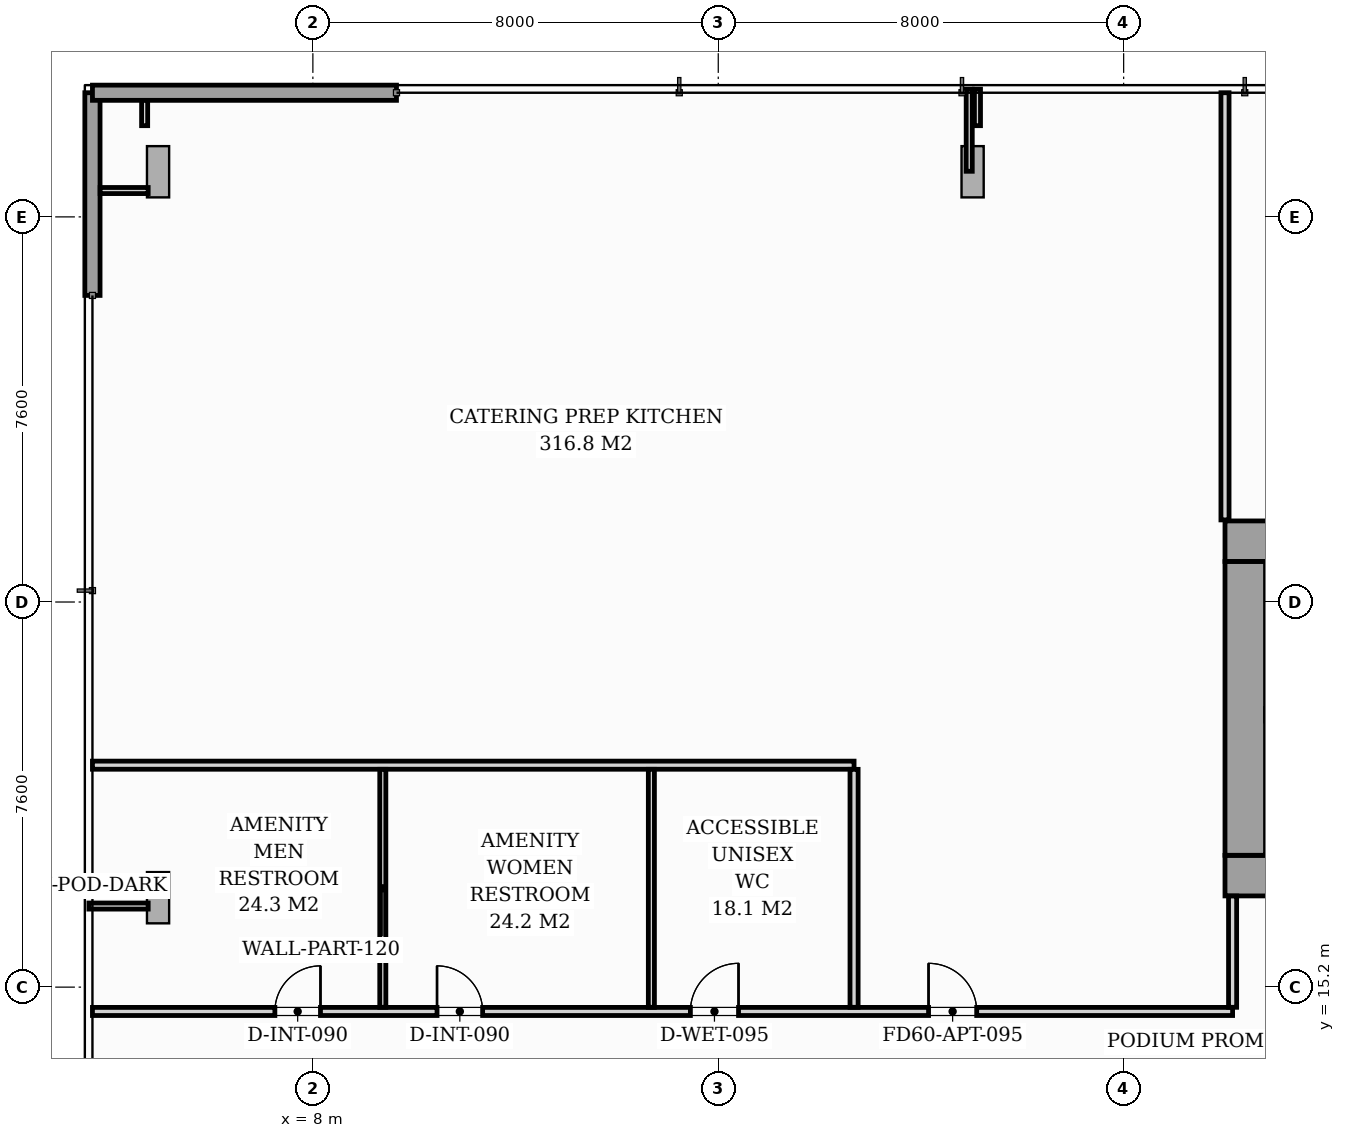
"""IFC4 building model, lengths in metres.
Left out: names, types, materials, properties, quantities, classifications, styles, units other than length and angle.
Written with IfcOpenShell. Run it as: python <this file> out.ifc"""

import sys

from ifc_helpers import new_model, si_unit, direction, frame, frame_2d, origin, origin_2d, place, context, subcontext, project, spatial, rectangle, i_section, extrude, source, transform, mapped, element, fill, save


model = new_model("IFC4")
c1 = context("Model", 3, precision=1e-05, world=origin(), true_north=direction((0.0, 1.0)))
c2 = subcontext(c1, "Body", "Model", "MODEL_VIEW")
j1 = project(units=[si_unit("LENGTHUNIT", "METRE"), si_unit("PLANEANGLEUNIT", "RADIAN")], contexts=[c1])
p1 = place(None, origin())
s1 = spatial("IfcSite", under=j1, at=p1, CompositionType="ELEMENT")
p2 = place(p1, origin())
s2 = spatial("IfcBuilding", under=s1, at=p2, CompositionType="ELEMENT")
p3 = place(p2, frame((0.0, 0.0, 14.0)))
s3 = spatial("IfcBuildingStorey", under=s2, at=p3, CompositionType="ELEMENT", Elevation=14.0)
m1 = source(origin(), c2, "Body", "SweptSolid", [
    extrude(i_section(OverallWidth=0.437, OverallDepth=0.514, WebThickness=0.061, FlangeThickness=0.097, FilletRadius=0.018, at=origin_2d()), origin(), (0.0, 0.0, 1.0), 4.496),
])
for number, where, z_axis, x_axis in (
    (1, (26.4, 17.4, 0.002), (0.0, 0.0, 1.0), (1.0, 0.0, 0.0)),
    (2, (26.4, 24.0, 0.002), (0.0, 0.0, 1.0), (1.0, 0.0, 0.0)),
):
    element("IfcColumn", number, at=place(p3, frame(where, z_axis=z_axis, x_axis=x_axis)), inside=s3, PredefinedType="PILASTER", context=c2, shape_type="MappedRepresentation", body=[
        mapped(m1, transform((0.0, 0.0, 0.0), scale=1.0)),
    ])
m2 = source(origin(), c2, "Body", "SweptSolid", [
    extrude(i_section(OverallWidth=0.438, OverallDepth=1.011, WebThickness=0.041, FlangeThickness=0.074, FilletRadius=0.024, at=origin_2d()), origin(), (0.0, 0.0, 1.0), 4.307),
])
p4 = place(p3, frame((4.704, 31.772, 0.109), z_axis=(0.197794721516, -0.395646133982, 0.896850815245), x_axis=(-0.401037899651, 0.802190742809, 0.442333149554)))
e3 = element("IfcColumn", 3, at=p4, inside=s3, PredefinedType="COLUMN", context=c2, shape_type="MappedRepresentation", body=[
    mapped(m2, transform((0.0, 0.0, 0.0), scale=1.0)),
])
m3 = source(origin(), c2, "Body", "SweptSolid", [
    extrude(i_section(OverallWidth=0.438, OverallDepth=1.011, WebThickness=0.041, FlangeThickness=0.074, FilletRadius=0.024, at=origin_2d()), origin(), (0.0, 0.0, 1.0), 4.249),
])
p5 = place(p3, frame((21.107, 31.775, 0.102), z_axis=(-0.072689306686, -0.402578089045, 0.912495011994), x_axis=(0.162137870713, 0.897974642067, 0.409087830527)))
e4 = element("IfcColumn", 4, at=p5, inside=s3, PredefinedType="COLUMN", context=c2, shape_type="MappedRepresentation", body=[
    mapped(m3, transform((0.0, 0.0, 0.0), scale=1.0)),
])
m4 = source(origin(), c2, "Body", "SweptSolid", [
    extrude(i_section(OverallWidth=0.438, OverallDepth=1.011, WebThickness=0.041, FlangeThickness=0.074, FilletRadius=0.024, at=origin_2d()), origin(), (0.0, 0.0, 1.0), 4.1),
])
p6 = place(p3, frame((4.696, 17.186, 0.074), z_axis=(0.211578067656, -0.188056160332, 0.959098327518), x_axis=(-0.716861290505, 0.637165199948, 0.283073132162)))
e5 = element("IfcColumn", 5, at=p6, inside=s3, PredefinedType="COLUMN", context=c2, shape_type="MappedRepresentation", body=[
    mapped(m4, transform((0.0, 0.0, 0.0), scale=1.0)),
])
p7 = place(p3, frame((3.65, 28.85, 0.0), z_axis=(0.0, 0.0, 1.0), x_axis=(0.0, 1.0, 0.0)))
e6 = element("IfcWall", 6, at=p7, inside=s3, PredefinedType="STANDARD", context=c2, shape_type="SweptSolid", body=[
    extrude(rectangle(XDim=4.0, YDim=0.3, at=frame_2d((2.0, 0.0))), origin(), (0.0, 0.0, 1.0), 4.08),
])
p8 = place(p3, frame((3.65, 32.85, 0.0), z_axis=(0.0, 0.0, 1.0), x_axis=(1.0, 0.0, 0.0)))
e7 = element("IfcWall", 7, at=p8, inside=s3, PredefinedType="STANDARD", context=c2, shape_type="SweptSolid", body=[
    extrude(rectangle(XDim=6.0, YDim=0.3, at=frame_2d((3.0, 0.0))), origin(), (0.0, 0.0, 1.0), 4.08),
])
p9 = place(p3, frame((26.0, 17.4, 0.0), z_axis=(0.0, 0.0, 1.0), x_axis=(1.0, 0.0, 0.0)))
e8 = element("IfcWall", 8, at=p9, inside=s3, PredefinedType="SHEAR", context=c2, shape_type="SweptSolid", body=[
    extrude(rectangle(XDim=20.0, YDim=0.8, at=frame_2d((10.0, 0.0))), origin(), (0.0, 0.0, 1.0), 4.5),
])
p10 = place(p9, frame((1.15, 0.0, 0.0)))
e9 = element("IfcOpeningElement", 9, at=p10, cuts=e8, PredefinedType="OPENING", context=c2, shape_type="SweptSolid", body=[
    extrude(rectangle(XDim=0.95, YDim=2.06, at=frame_2d((0.475, 1.03))), frame((0.0, 0.41, 0.0), z_axis=(0.0, -1.0, 0.0), x_axis=(1.0, 0.0, 0.0)), (0.0, 0.0, 1.0), 0.82),
])
p11 = place(p9, frame((9.58, 0.0, 0.0)))
e10 = element("IfcOpeningElement", 10, at=p11, cuts=e8, PredefinedType="OPENING", context=c2, shape_type="SweptSolid", body=[
    extrude(rectangle(XDim=0.9, YDim=2.06, at=frame_2d((0.45, 1.03))), frame((0.0, 0.41, 0.0), z_axis=(0.0, -1.0, 0.0), x_axis=(1.0, 0.0, 0.0)), (0.0, 0.0, 1.0), 0.82),
])
p12 = place(p9, frame((17.75, 0.0, 0.0)))
e11 = element("IfcOpeningElement", 11, at=p12, cuts=e8, PredefinedType="OPENING", context=c2, shape_type="SweptSolid", body=[
    extrude(rectangle(XDim=0.95, YDim=2.06, at=frame_2d((0.475, 1.03))), frame((0.0, 0.41, 0.0), z_axis=(0.0, -1.0, 0.0), x_axis=(1.0, 0.0, 0.0)), (0.0, 0.0, 1.0), 0.82),
])
p13 = place(p3, frame((26.0, 24.0, 0.0), z_axis=(0.0, 0.0, 1.0), x_axis=(1.0, 0.0, 0.0)))
e12 = element("IfcWall", 12, at=p13, inside=s3, PredefinedType="SHEAR", context=c2, shape_type="SweptSolid", body=[
    extrude(rectangle(XDim=20.0, YDim=0.8, at=frame_2d((10.0, 0.0))), origin(), (0.0, 0.0, 1.0), 4.5),
])
p14 = place(p3, frame((26.4, 17.802, 0.0), z_axis=(0.0, 0.0, 1.0), x_axis=(0.0, 1.0, 0.0)))
e13 = element("IfcWall", 13, at=p14, inside=s3, PredefinedType="SHEAR", context=c2, shape_type="SweptSolid", body=[
    extrude(rectangle(XDim=5.796, YDim=0.8, at=frame_2d((2.898, 0.0))), origin(), (0.0, 0.0, 1.0), 4.5),
])
p15 = place(p3, frame((3.65, 14.72, 0.0), z_axis=(0.0, 0.0, 1.0), x_axis=(1.0, 0.0, 0.0)))
e14 = element("IfcWall", 14, at=p15, inside=s3, PredefinedType="PARTITIONING", context=c2, shape_type="SweptSolid", body=[
    extrude(rectangle(XDim=22.5, YDim=0.16, at=frame_2d((11.25, 0.0))), origin(), (0.0, 0.0, 1.0), 4.08),
])
p16 = place(p15, frame((16.5, 0.0, 0.0)))
e15 = element("IfcOpeningElement", 15, at=p16, cuts=e14, PredefinedType="OPENING", context=c2, shape_type="SweptSolid", body=[
    extrude(rectangle(XDim=0.95, YDim=2.06, at=frame_2d((0.475, 1.03))), frame((0.0, 0.09, 0.0), z_axis=(0.0, -1.0, 0.0), x_axis=(1.0, 0.0, 0.0)), (0.0, 0.0, 1.0), 0.18),
])
p17 = place(p15, frame((3.6, 0.0, 0.0)))
e16 = element("IfcOpeningElement", 16, at=p17, cuts=e14, PredefinedType="OPENING", context=c2, shape_type="SweptSolid", body=[
    extrude(rectangle(XDim=0.9, YDim=2.05, at=frame_2d((0.45, 1.025))), frame((0.0, 0.09, 0.0), z_axis=(0.0, -1.0, 0.0), x_axis=(1.0, 0.0, 0.0)), (0.0, 0.0, 1.0), 0.18),
])
p18 = place(p15, frame((6.8, 0.0, 0.0)))
e17 = element("IfcOpeningElement", 17, at=p18, cuts=e14, PredefinedType="OPENING", context=c2, shape_type="SweptSolid", body=[
    extrude(rectangle(XDim=0.9, YDim=2.05, at=frame_2d((0.45, 1.025))), frame((0.0, 0.09, 0.0), z_axis=(0.0, -1.0, 0.0), x_axis=(1.0, 0.0, 0.0)), (0.0, 0.0, 1.0), 0.18),
])
p19 = place(p15, frame((11.8, 0.0, 0.0)))
e18 = element("IfcOpeningElement", 18, at=p19, cuts=e14, PredefinedType="OPENING", context=c2, shape_type="SweptSolid", body=[
    extrude(rectangle(XDim=0.95, YDim=2.1, at=frame_2d((0.475, 1.05))), frame((0.0, 0.09, 0.0), z_axis=(0.0, -1.0, 0.0), x_axis=(1.0, 0.0, 0.0)), (0.0, 0.0, 1.0), 0.18),
])
p20 = place(p3, frame((3.65, 19.58, 0.0), z_axis=(0.0, 0.0, 1.0), x_axis=(1.0, 0.0, 0.0)))
e19 = element("IfcWall", 19, at=p20, inside=s3, PredefinedType="PARTITIONING", context=c2, shape_type="SweptSolid", body=[
    extrude(rectangle(XDim=15.03, YDim=0.16, at=frame_2d((7.515, 0.0))), origin(), (0.0, 0.0, 1.0), 4.08),
])
for number, where, z_axis, x_axis in (
    (20, (9.38, 14.802, 0.0), (0.0, 0.0, 1.0), (0.0, 1.0, 0.0)),
    (21, (14.68, 14.802, 0.0), (0.0, 0.0, 1.0), (0.0, 1.0, 0.0)),
):
    element("IfcWall", number, at=place(p3, frame(where, z_axis=z_axis, x_axis=x_axis)), inside=s3, PredefinedType="PARTITIONING", context=c2, shape_type="SweptSolid", body=[
        extrude(rectangle(XDim=4.696, YDim=0.12, at=frame_2d((2.348, 0.0))), origin(), (0.0, 0.0, 1.0), 4.08),
    ])
p21 = place(p3, frame((18.68, 14.802, 0.0), z_axis=(0.0, 0.0, 1.0), x_axis=(0.0, 1.0, 0.0)))
e22 = element("IfcWall", 22, at=p21, inside=s3, PredefinedType="PARTITIONING", context=c2, shape_type="SweptSolid", body=[
    extrude(rectangle(XDim=4.696, YDim=0.16, at=frame_2d((2.348, 0.0))), origin(), (0.0, 0.0, 1.0), 4.08),
])
p22 = place(p3, frame((26.0, 24.42, 0.0), z_axis=(0.0, 0.0, 1.0), x_axis=(0.0, 1.0, 0.0)))
e23 = element("IfcWall", 23, at=p22, inside=s3, PredefinedType="PARTITIONING", context=c2, shape_type="SweptSolid", body=[
    extrude(rectangle(XDim=8.43, YDim=0.16, at=frame_2d((4.215, 0.0))), origin(), (0.0, 0.0, 1.0), 4.08),
])
p23 = place(p3, frame((26.15, 14.802, 0.0), z_axis=(0.0, 0.0, 1.0), x_axis=(0.0, 1.0, 0.0)))
e24 = element("IfcWall", 24, at=p23, inside=s3, PredefinedType="PARTITIONING", context=c2, shape_type="SweptSolid", body=[
    extrude(rectangle(XDim=2.196, YDim=0.16, at=frame_2d((1.098, 0.0))), origin(), (0.0, 0.0, 1.0), 4.08),
])
p24 = place(p3, frame((4.75, 30.92, 0.0), z_axis=(0.0, 0.0, 1.0), x_axis=(-1.0, 0.0, 0.0)))
e25 = element("IfcWall", 25, at=p24, inside=s3, PredefinedType="PARTITIONING", context=c2, shape_type="SweptSolid", body=[
    extrude(rectangle(XDim=0.948, YDim=0.12, at=frame_2d((0.474, 0.0))), origin(), (0.0, 0.0, 1.0), 4.08),
])
p25 = place(p3, frame((20.952, 31.3, 0.0), z_axis=(0.0, 0.0, 1.0), x_axis=(0.0, 1.0, 0.0)))
e26 = element("IfcWall", 26, at=p25, inside=s3, PredefinedType="PARTITIONING", context=c2, shape_type="SweptSolid", body=[
    extrude(rectangle(XDim=1.62, YDim=0.12, at=frame_2d((0.81, 0.0))), origin(), (0.0, 0.0, 1.0), 4.08),
])
p26 = place(p3, frame((4.75, 16.8, 0.0), z_axis=(0.0, 0.0, 1.0), x_axis=(-1.0, 0.0, 0.0)))
e27 = element("IfcWall", 27, at=p26, inside=s3, PredefinedType="PARTITIONING", context=c2, shape_type="SweptSolid", body=[
    extrude(rectangle(XDim=1.17, YDim=0.12, at=frame_2d((0.585, 0.0))), origin(), (0.0, 0.0, 1.0), 4.08),
])
p27 = place(p3, frame((4.68, 32.2, 0.0), z_axis=(0.0, 0.0, 1.0), x_axis=(0.0, 1.0, 0.0)))
e28 = element("IfcWall", 28, at=p27, inside=s3, PredefinedType="PARTITIONING", context=c2, shape_type="SweptSolid", body=[
    extrude(rectangle(XDim=0.498, YDim=0.12, at=frame_2d((0.249, 0.0))), origin(), (0.0, 0.0, 1.0), 4.08),
])
for number, where, z_axis, x_axis in (
    (29, (21.115, 32.2, 0.0), (0.0, 0.0, 1.0), (0.0, 1.0, 0.0)),
    (30, (4.3, 17.2, 0.0), (0.0, 0.0, 1.0), (-1.0, 0.0, 0.0)),
):
    element("IfcWall", number, at=place(p3, frame(where, z_axis=z_axis, x_axis=x_axis)), inside=s3, PredefinedType="PARTITIONING", context=c2, shape_type="SweptSolid", body=[
        extrude(rectangle(XDim=0.72, YDim=0.12, at=frame_2d((0.36, 0.0))), origin(), (0.0, 0.0, 1.0), 4.08),
    ])
m5 = source(origin(), c2, "Body", "SweptSolid", [
    extrude(rectangle(XDim=0.95, YDim=2.06, at=frame_2d((0.475, 1.03))), frame((0.0, 0.025, 0.0), z_axis=(0.0, -1.0, 0.0), x_axis=(1.0, 0.0, 0.0)), (0.0, 0.0, 1.0), 0.05),
])
p28 = place(p16, origin())
e31 = element("IfcDoor", 31, at=p28, inside=s3, OperationType="SINGLE_SWING_LEFT", PredefinedType="DOOR", context=c2, shape_type="MappedRepresentation", body=[
    mapped(m5, transform((0.0, 0.0, 0.0), scale=1.0)),
])
fill(e15, e31)
m6 = source(origin(), c2, "Body", "SweptSolid", [
    extrude(rectangle(XDim=0.9, YDim=2.05, at=frame_2d((0.45, 1.025))), frame((0.0, 0.025, 0.0), z_axis=(0.0, -1.0, 0.0), x_axis=(1.0, 0.0, 0.0)), (0.0, 0.0, 1.0), 0.05),
])
p29 = place(p17, origin())
e32 = element("IfcDoor", 32, at=p29, inside=s3, OperationType="SINGLE_SWING_RIGHT", PredefinedType="DOOR", context=c2, shape_type="MappedRepresentation", body=[
    mapped(m6, transform((0.0, 0.0, 0.0), scale=1.0)),
])
fill(e16, e32)
p30 = place(p18, origin())
e33 = element("IfcDoor", 33, at=p30, inside=s3, OperationType="SINGLE_SWING_LEFT", PredefinedType="DOOR", context=c2, shape_type="MappedRepresentation", body=[
    mapped(m6, transform((0.0, 0.0, 0.0), scale=1.0)),
])
fill(e17, e33)
m7 = source(origin(), c2, "Body", "SweptSolid", [
    extrude(rectangle(XDim=0.95, YDim=2.1, at=frame_2d((0.475, 1.05))), frame((0.0, 0.025, 0.0), z_axis=(0.0, -1.0, 0.0), x_axis=(1.0, 0.0, 0.0)), (0.0, 0.0, 1.0), 0.05),
])
p31 = place(p19, origin())
e34 = element("IfcDoor", 34, at=p31, inside=s3, OperationType="SINGLE_SWING_RIGHT", PredefinedType="DOOR", context=c2, shape_type="MappedRepresentation", body=[
    mapped(m7, transform((0.0, 0.0, 0.0), scale=1.0)),
])
fill(e18, e34)
save(model, sys.argv[1])
